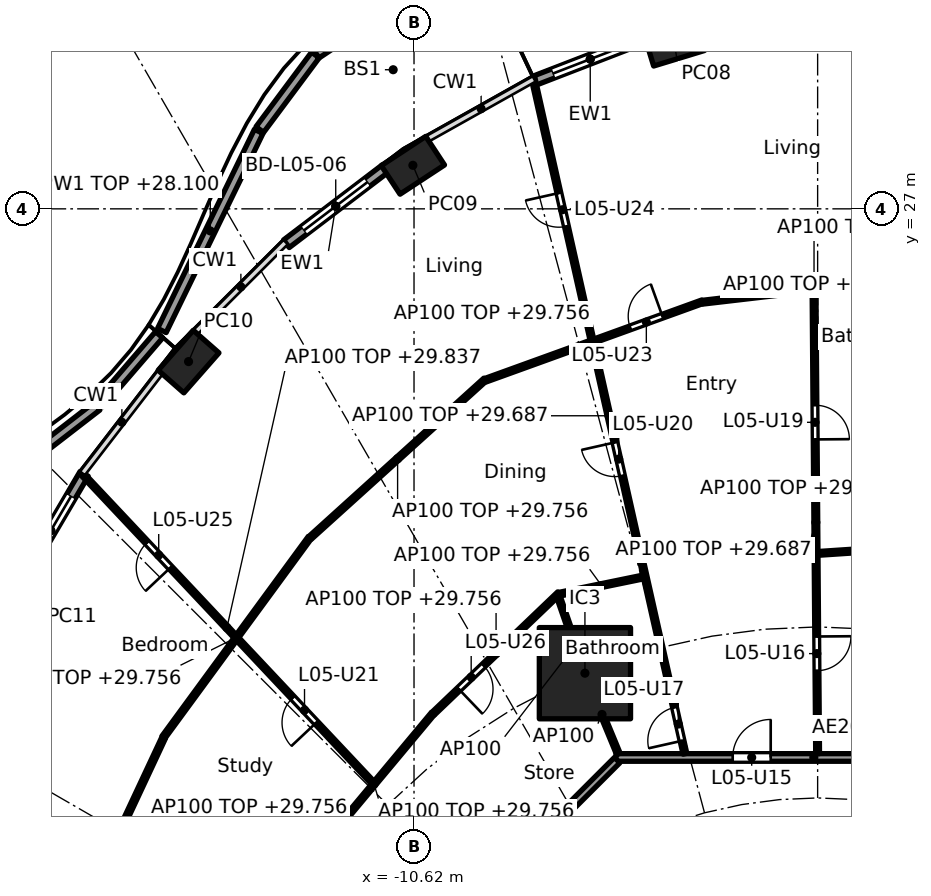
"""IFC4 building model, lengths in metres.
Left out: names, types, materials, properties, quantities, classifications, styles, units other than length and angle.
Written with IfcOpenShell. Run it as: python <this file> out.ifc"""

import sys

from ifc_helpers import new_model, si_unit, direction, frame, frame_2d, origin, origin_2d, place, context, subcontext, project, spatial, rectangle, hollow_rectangle, extrude, element, fill, save


model = new_model("IFC4")
c1 = context("Model", 3, precision=1e-05, world=origin(), true_north=direction((0.0, 1.0)))
c2 = subcontext(c1, "Body", "Model", "MODEL_VIEW")
j1 = project(units=[si_unit("LENGTHUNIT", "METRE"), si_unit("PLANEANGLEUNIT", "RADIAN")], contexts=[c1])
p1 = place(None, origin())
s1 = spatial("IfcSite", under=j1, at=p1, CompositionType="ELEMENT")
p2 = place(p1, origin())
s2 = spatial("IfcBuilding", under=s1, at=p2, CompositionType="ELEMENT")
p3 = place(p2, frame((0.0, 0.0, 27.0)))
s3 = spatial("IfcBuildingStorey", under=s2, at=p3, CompositionType="ELEMENT", Elevation=27.0)
for number, where, z_axis, x_axis in (
    (1, (-3.776, 31.393, 0.0), (0.0, 0.0, 1.0), (-0.957, -0.292, 0.0)),
    (2, (-10.65, 28.146, 0.0), (0.0, 0.0, 1.0), (-0.836, -0.549, 0.0)),
    (3, (-16.552, 22.981, 0.0), (0.0, 0.0, 1.0), (-0.66, -0.751, 0.0)),
):
    element("IfcColumn", number, at=place(p3, frame(where, z_axis=z_axis, x_axis=x_axis)), inside=s3, PredefinedType="COLUMN", context=c2, shape_type="SweptSolid", body=[
        extrude(hollow_rectangle(XDim=1.4, YDim=0.9, WallThickness=0.05, at=origin_2d()), origin(), (0.0, 0.0, 1.0), 3.7),
    ])
p4 = place(p3, frame((-6.123, 14.782, 0.0), z_axis=(0.0, 0.0, 1.0), x_axis=(1.0, 0.0, 0.0)))
e4 = element("IfcColumn", 4, at=p4, inside=s3, PredefinedType="COLUMN", context=c2, shape_type="SweptSolid", body=[
    extrude(rectangle(XDim=2.4, YDim=2.4, at=origin_2d()), origin(), (0.0, 0.0, 1.0), 3.7),
])
p5 = place(p3, frame((-7.453, 30.371, 0.0), z_axis=(0.0, 0.0, 1.0), x_axis=(0.932809381943, 0.360370166577, 0.0)))
e5 = element("IfcWall", 5, at=p5, inside=s3, PredefinedType="SOLIDWALL", context=c2, shape_type="SweptSolid", body=[
    extrude(rectangle(XDim=3.151, YDim=0.25, at=frame_2d((1.575, 0.0))), origin(), (0.0, 0.0, 1.0), 3.44),
])
p6 = place(p5, frame((0.525, 0.0, 0.0)))
e6 = element("IfcOpeningElement", 6, at=p6, cuts=e5, PredefinedType="OPENING", context=c2, shape_type="SweptSolid", body=[
    extrude(rectangle(XDim=2.1, YDim=2.4, at=frame_2d((1.05, 1.2))), frame((0.0, 0.135, 0.0), z_axis=(0.0, -1.0, 0.0), x_axis=(1.0, 0.0, 0.0)), (0.0, 0.0, 1.0), 0.27),
])
p7 = place(p3, frame((-13.979, 26.081, 0.0), z_axis=(0.0, 0.0, 1.0), x_axis=(0.796022293214, 0.605267303517, 0.0)))
e7 = element("IfcWall", 7, at=p7, inside=s3, PredefinedType="SOLIDWALL", context=c2, shape_type="SweptSolid", body=[
    extrude(rectangle(XDim=3.262, YDim=0.25, at=frame_2d((1.631, 0.0))), origin(), (0.0, 0.0, 1.0), 3.44),
])
p8 = place(p7, frame((0.581, 0.0, 0.0)))
e8 = element("IfcOpeningElement", 8, at=p8, cuts=e7, PredefinedType="OPENING", context=c2, shape_type="SweptSolid", body=[
    extrude(rectangle(XDim=2.1, YDim=2.4, at=frame_2d((1.05, 1.2))), frame((0.0, 0.135, 0.0), z_axis=(0.0, -1.0, 0.0), x_axis=(1.0, 0.0, 0.0)), (0.0, 0.0, 1.0), 0.27),
])
p9 = place(p3, frame((-21.052, 17.04, 0.0), z_axis=(0.0, 0.0, 1.0), x_axis=(0.506311160839, 0.862350861546, 0.0)))
e9 = element("IfcWall", 9, at=p9, inside=s3, PredefinedType="SOLIDWALL", context=c2, shape_type="SweptSolid", body=[
    extrude(rectangle(XDim=3.462, YDim=0.25, at=frame_2d((1.731, 0.0))), origin(), (0.0, 0.0, 1.0), 3.44),
])
p10 = place(p9, frame((0.681, 0.0, 0.0)))
e10 = element("IfcOpeningElement", 10, at=p10, cuts=e9, PredefinedType="OPENING", context=c2, shape_type="SweptSolid", body=[
    extrude(rectangle(XDim=2.1, YDim=2.4, at=frame_2d((1.05, 1.2))), frame((0.0, 0.135, 0.0), z_axis=(0.0, -1.0, 0.0), x_axis=(1.0, 0.0, 0.0)), (0.0, 0.0, 1.0), 0.27),
])
p11 = place(p3, frame((-11.228, 32.379, 0.0), z_axis=(0.0, 0.0, 1.0), x_axis=(-0.832193744061, -0.554484961334, 0.0)))
e11 = element("IfcWall", 11, at=p11, inside=s3, PredefinedType="PARAPET", context=c2, shape_type="SweptSolid", body=[
    extrude(rectangle(XDim=2.356, YDim=0.25, at=frame_2d((1.178, 0.0))), origin(), (0.0, 0.0, 1.0), 1.1),
])
p12 = place(p3, frame((-13.215, 31.048, 0.0), z_axis=(0.0, 0.0, 1.0), x_axis=(-0.597715227752, -0.80170849223, 0.0)))
e12 = element("IfcWall", 12, at=p12, inside=s3, PredefinedType="PARAPET", context=c2, shape_type="SweptSolid", body=[
    extrude(rectangle(XDim=2.448, YDim=0.25, at=frame_2d((1.224, 0.0))), origin(), (0.0, 0.0, 1.0), 1.1),
])
p13 = place(p3, frame((-14.707, 29.038, 0.0), z_axis=(0.0, 0.0, 1.0), x_axis=(-0.437296277374, -0.899317499994, 0.0)))
e13 = element("IfcWall", 13, at=p13, inside=s3, PredefinedType="PARAPET", context=c2, shape_type="SweptSolid", body=[
    extrude(rectangle(XDim=5.826, YDim=0.25, at=frame_2d((2.913, 0.0))), origin(), (0.0, 0.0, 1.0), 1.1),
])
p14 = place(p3, frame((-17.327, 23.688, 0.0), z_axis=(0.0, 0.0, 1.0), x_axis=(-0.652642199991, -0.757666258184, 0.0)))
e14 = element("IfcWall", 14, at=p14, inside=s3, PredefinedType="PARAPET", context=c2, shape_type="SweptSolid", body=[
    extrude(rectangle(XDim=2.387, YDim=0.25, at=frame_2d((1.194, 0.0))), origin(), (0.0, 0.0, 1.0), 1.1),
])
p15 = place(p3, frame((-18.961, 21.807, 0.0), z_axis=(0.0, 0.0, 1.0), x_axis=(-0.791260452579, -0.611479268811, 0.0)))
e15 = element("IfcWall", 15, at=p15, inside=s3, PredefinedType="PARAPET", context=c2, shape_type="SweptSolid", body=[
    extrude(rectangle(XDim=6.999, YDim=0.25, at=frame_2d((3.5, 0.0))), origin(), (0.0, 0.0, 1.0), 1.1),
])
p16 = place(p3, frame((5.104, 12.565, 0.0), z_axis=(0.0, 0.0, 1.0), x_axis=(-1.0, 0.0, 0.0)))
e16 = element("IfcWall", 16, at=p16, inside=s3, PredefinedType="PARTITIONING", context=c2, shape_type="SweptSolid", body=[
    extrude(rectangle(XDim=10.409, YDim=0.2, at=frame_2d((5.205, 0.0))), origin(), (0.0, 0.0, 1.0), 3.44),
])
p17 = place(p16, frame((6.339, 0.0, 0.0)))
e17 = element("IfcOpeningElement", 17, at=p17, cuts=e16, PredefinedType="OPENING", context=c2, shape_type="SweptSolid", body=[
    extrude(rectangle(XDim=1.0, YDim=2.1, at=frame_2d((0.5, 1.05))), frame((0.0, 0.11, 0.0), z_axis=(0.0, -1.0, 0.0), x_axis=(1.0, 0.0, 0.0)), (0.0, 0.0, 1.0), 0.22),
])
p18 = place(p3, frame((-5.275, 12.494, 0.0), z_axis=(0.0, 0.0, 1.0), x_axis=(-0.707106781187, -0.707106781187, 0.0)))
e18 = element("IfcWall", 18, at=p18, inside=s3, PredefinedType="PARTITIONING", context=c2, shape_type="SweptSolid", body=[
    extrude(rectangle(XDim=10.209, YDim=0.2, at=frame_2d((5.104, 0.0))), origin(), (0.0, 0.0, 1.0), 3.44),
])
p19 = place(p3, frame((2.188, 18.079, 0.0), z_axis=(0.0, 0.0, 1.0), x_axis=(-0.997794542617, -0.066378089183, 0.0)))
e19 = element("IfcWall", 19, at=p19, inside=s3, PredefinedType="PARTITIONING", context=c2, shape_type="SweptSolid", body=[
    extrude(rectangle(XDim=2.185, YDim=0.1, at=frame_2d((1.092, 0.0))), origin(), (0.0, 0.0, 1.0), 2.756),
])
p20 = place(p3, frame((2.842, 25.229, 0.0), z_axis=(0.0, 0.0, 1.0), x_axis=(-0.993255612046, -0.115945198862, 0.0)))
e20 = element("IfcWall", 20, at=p20, inside=s3, PredefinedType="PARTITIONING", context=c2, shape_type="SweptSolid", body=[
    extrude(rectangle(XDim=5.913, YDim=0.1, at=frame_2d((2.956, 0.0))), origin(), (0.0, 0.0, 1.0), 2.756),
])
p21 = place(p3, frame((-0.001, 12.665, 0.0), z_axis=(0.0, 0.0, 1.0), x_axis=(-0.007702417287, 0.999970335944, 0.0)))
e21 = element("IfcWall", 21, at=p21, inside=s3, PredefinedType="PARTITIONING", context=c2, shape_type="SweptSolid", body=[
    extrude(rectangle(XDim=12.171, YDim=0.1, at=frame_2d((6.086, 0.0))), origin(), (0.0, 0.0, 1.0), 2.687),
])
p22 = place(p21, frame((2.183, 0.0, 0.0)))
e22 = element("IfcOpeningElement", 22, at=p22, cuts=e21, PredefinedType="OPENING", context=c2, shape_type="SweptSolid", body=[
    extrude(rectangle(XDim=0.9, YDim=2.1, at=frame_2d((0.45, 1.05))), frame((0.0, 0.06, 0.0), z_axis=(0.0, -1.0, 0.0), x_axis=(1.0, 0.0, 0.0)), (0.0, 0.0, 1.0), 0.12),
])
p23 = place(p21, frame((8.269, 0.0, 0.0)))
e23 = element("IfcOpeningElement", 23, at=p23, cuts=e21, PredefinedType="OPENING", context=c2, shape_type="SweptSolid", body=[
    extrude(rectangle(XDim=0.9, YDim=2.1, at=frame_2d((0.45, 1.05))), frame((0.0, 0.06, 0.0), z_axis=(0.0, -1.0, 0.0), x_axis=(1.0, 0.0, 0.0)), (0.0, 0.0, 1.0), 0.12),
])
p24 = place(p3, frame((-3.034, 24.554, 0.0), z_axis=(0.0, 0.0, 1.0), x_axis=(-0.940401691072, -0.340065669288, 0.0)))
e24 = element("IfcWall", 24, at=p24, inside=s3, PredefinedType="PARTITIONING", context=c2, shape_type="SweptSolid", body=[
    extrude(rectangle(XDim=6.067, YDim=0.1, at=frame_2d((3.034, 0.0))), origin(), (0.0, 0.0, 1.0), 2.756),
])
p25 = place(p24, frame((1.117, 0.0, 0.0)))
e25 = element("IfcOpeningElement", 25, at=p25, cuts=e24, PredefinedType="OPENING", context=c2, shape_type="SweptSolid", body=[
    extrude(rectangle(XDim=0.9, YDim=2.1, at=frame_2d((0.45, 1.05))), frame((0.0, 0.06, 0.0), z_axis=(0.0, -1.0, 0.0), x_axis=(1.0, 0.0, 0.0)), (0.0, 0.0, 1.0), 0.12),
])
p26 = place(p3, frame((-3.492, 12.662, 0.0), z_axis=(0.0, 0.0, 1.0), x_axis=(-0.219268088006, 0.975664648115, 0.0)))
e26 = element("IfcWall", 26, at=p26, inside=s3, PredefinedType="PARTITIONING", context=c2, shape_type="SweptSolid", body=[
    extrude(rectangle(XDim=18.23, YDim=0.1, at=frame_2d((9.115, 0.0))), origin(), (0.0, 0.0, 1.0), 2.687),
])
p27 = place(p26, frame((0.35, 0.0, 0.0)))
e27 = element("IfcOpeningElement", 27, at=p27, cuts=e26, PredefinedType="OPENING", context=c2, shape_type="SweptSolid", body=[
    extrude(rectangle(XDim=0.9, YDim=2.1, at=frame_2d((0.45, 1.05))), frame((0.0, 0.06, 0.0), z_axis=(0.0, -1.0, 0.0), x_axis=(1.0, 0.0, 0.0)), (0.0, 0.0, 1.0), 0.12),
])
p28 = place(p26, frame((7.497, 0.0, 0.0)))
e28 = element("IfcOpeningElement", 28, at=p28, cuts=e26, PredefinedType="OPENING", context=c2, shape_type="SweptSolid", body=[
    extrude(rectangle(XDim=0.9, YDim=2.1, at=frame_2d((0.45, 1.05))), frame((0.0, 0.06, 0.0), z_axis=(0.0, -1.0, 0.0), x_axis=(1.0, 0.0, 0.0)), (0.0, 0.0, 1.0), 0.12),
])
p29 = place(p26, frame((14.223, 0.0, 0.0)))
e29 = element("IfcOpeningElement", 29, at=p29, cuts=e26, PredefinedType="OPENING", context=c2, shape_type="SweptSolid", body=[
    extrude(rectangle(XDim=0.9, YDim=2.1, at=frame_2d((0.45, 1.05))), frame((0.0, 0.06, 0.0), z_axis=(0.0, -1.0, 0.0), x_axis=(1.0, 0.0, 0.0)), (0.0, 0.0, 1.0), 0.12),
])
p30 = place(p3, frame((-4.58, 17.315, 0.0), z_axis=(0.0, 0.0, 1.0), x_axis=(-0.979581941859, -0.201045316246, 0.0)))
e30 = element("IfcWall", 30, at=p30, inside=s3, PredefinedType="PARTITIONING", context=c2, shape_type="SweptSolid", body=[
    extrude(rectangle(XDim=2.256, YDim=0.1, at=frame_2d((1.128, 0.0))), origin(), (0.0, 0.0, 1.0), 2.756),
])
p31 = place(p3, frame((-5.243, 12.657, 0.0), z_axis=(0.0, 0.0, 1.0), x_axis=(-0.382719158442, 0.923864733477, 0.0)))
e31 = element("IfcWall", 31, at=p31, inside=s3, PredefinedType="PARTITIONING", context=c2, shape_type="SweptSolid", body=[
    extrude(rectangle(XDim=2.25, YDim=0.1, at=frame_2d((1.125, 0.0))), origin(), (0.0, 0.0, 1.0), 3.44),
])
p32 = place(p3, frame((-6.139, 14.83, 0.0), z_axis=(0.0, 0.0, 1.0), x_axis=(-0.327246993321, 0.944938836837, 0.0)))
e32 = element("IfcWall", 32, at=p32, inside=s3, PredefinedType="PARTITIONING", context=c2, shape_type="SweptSolid", body=[
    extrude(rectangle(XDim=2.09, YDim=0.1, at=frame_2d((1.045, 0.0))), origin(), (0.0, 0.0, 1.0), 3.44),
])
p33 = place(p3, frame((-6.803, 16.886, 0.0), z_axis=(0.0, 0.0, 1.0), x_axis=(-0.722763212502, -0.69109575216, 0.0)))
e33 = element("IfcWall", 33, at=p33, inside=s3, PredefinedType="PARTITIONING", context=c2, shape_type="SweptSolid", body=[
    extrude(rectangle(XDim=4.587, YDim=0.1, at=frame_2d((2.293, 0.0))), origin(), (0.0, 0.0, 1.0), 2.756),
])
p34 = place(p33, frame((2.75, 0.0, 0.0)))
e34 = element("IfcOpeningElement", 34, at=p34, cuts=e33, PredefinedType="OPENING", context=c2, shape_type="SweptSolid", body=[
    extrude(rectangle(XDim=0.9, YDim=2.1, at=frame_2d((0.45, 1.05))), frame((0.0, 0.06, 0.0), z_axis=(0.0, -1.0, 0.0), x_axis=(1.0, 0.0, 0.0)), (0.0, 0.0, 1.0), 0.12),
])
p35 = place(p3, frame((-8.749, 22.508, 0.0), z_axis=(0.0, 0.0, 1.0), x_axis=(-0.741720189244, -0.670709445936, 0.0)))
e35 = element("IfcWall", 35, at=p35, inside=s3, PredefinedType="PARTITIONING", context=c2, shape_type="SweptSolid", body=[
    extrude(rectangle(XDim=6.209, YDim=0.1, at=frame_2d((3.104, 0.0))), origin(), (0.0, 0.0, 1.0), 2.756),
])
p36 = place(p3, frame((-10.123, 13.72, 0.0), z_axis=(0.0, 0.0, 1.0), x_axis=(-0.64083455704, -0.767679015282, 0.0)))
e36 = element("IfcWall", 36, at=p36, inside=s3, PredefinedType="PARTITIONING", context=c2, shape_type="SweptSolid", body=[
    extrude(rectangle(XDim=4.837, YDim=0.1, at=frame_2d((2.418, 0.0))), origin(), (0.0, 0.0, 1.0), 2.756),
])
p37 = place(p3, frame((-13.362, 18.35, 0.0), z_axis=(0.0, 0.0, 1.0), x_axis=(-0.591191311491, -0.806531359104, 0.0)))
e37 = element("IfcWall", 37, at=p37, inside=s3, PredefinedType="PARTITIONING", context=c2, shape_type="SweptSolid", body=[
    extrude(rectangle(XDim=6.51, YDim=0.1, at=frame_2d((3.255, 0.0))), origin(), (0.0, 0.0, 1.0), 2.756),
])
p38 = place(p3, frame((-11.707, 11.9, 0.0), z_axis=(0.0, 0.0, 1.0), x_axis=(-0.685030806147, 0.728514100501, 0.0)))
e38 = element("IfcWall", 38, at=p38, inside=s3, PredefinedType="PARTITIONING", context=c2, shape_type="SweptSolid", body=[
    extrude(rectangle(XDim=11.201, YDim=0.1, at=frame_2d((5.601, 0.0))), origin(), (0.0, 0.0, 1.0), 2.837),
])
p39 = place(p38, frame((2.169, 0.0, 0.0)))
e39 = element("IfcOpeningElement", 39, at=p39, cuts=e38, PredefinedType="OPENING", context=c2, shape_type="SweptSolid", body=[
    extrude(rectangle(XDim=0.9, YDim=2.1, at=frame_2d((0.45, 1.05))), frame((0.0, 0.06, 0.0), z_axis=(0.0, -1.0, 0.0), x_axis=(1.0, 0.0, 0.0)), (0.0, 0.0, 1.0), 0.12),
])
p40 = place(p38, frame((7.77, 0.0, 0.0)))
e40 = element("IfcOpeningElement", 40, at=p40, cuts=e38, PredefinedType="OPENING", context=c2, shape_type="SweptSolid", body=[
    extrude(rectangle(XDim=0.9, YDim=2.1, at=frame_2d((0.45, 1.05))), frame((0.0, 0.06, 0.0), z_axis=(0.0, -1.0, 0.0), x_axis=(1.0, 0.0, 0.0)), (0.0, 0.0, 1.0), 0.12),
])
p41 = place(p3, frame((-17.203, 13.095, 0.0), z_axis=(0.0, 0.0, 1.0), x_axis=(-0.423926333401, -0.905696673202, 0.0)))
e41 = element("IfcWall", 41, at=p41, inside=s3, PredefinedType="PARTITIONING", context=c2, shape_type="SweptSolid", body=[
    extrude(rectangle(XDim=6.188, YDim=0.1, at=frame_2d((3.094, 0.0))), origin(), (0.0, 0.0, 1.0), 2.756),
])
p42 = place(p6, origin())
e42 = element("IfcDoor", 42, at=p42, inside=s3, OperationType="SLIDING_TO_LEFT", PredefinedType="DOOR", context=c2, shape_type="SweptSolid", body=[
    extrude(rectangle(XDim=2.1, YDim=2.4, at=frame_2d((1.05, 1.2))), frame((0.0, 0.025, 0.0), z_axis=(0.0, -1.0, 0.0), x_axis=(1.0, 0.0, 0.0)), (0.0, 0.0, 1.0), 0.05),
])
fill(e6, e42)
p43 = place(p8, origin())
e43 = element("IfcDoor", 43, at=p43, inside=s3, OperationType="SLIDING_TO_LEFT", PredefinedType="DOOR", context=c2, shape_type="SweptSolid", body=[
    extrude(rectangle(XDim=2.1, YDim=2.4, at=frame_2d((1.05, 1.2))), frame((0.0, 0.025, 0.0), z_axis=(0.0, -1.0, 0.0), x_axis=(1.0, 0.0, 0.0)), (0.0, 0.0, 1.0), 0.05),
])
fill(e8, e43)
p44 = place(p10, origin())
e44 = element("IfcDoor", 44, at=p44, inside=s3, OperationType="SLIDING_TO_LEFT", PredefinedType="DOOR", context=c2, shape_type="SweptSolid", body=[
    extrude(rectangle(XDim=2.1, YDim=2.4, at=frame_2d((1.05, 1.2))), frame((0.0, 0.025, 0.0), z_axis=(0.0, -1.0, 0.0), x_axis=(1.0, 0.0, 0.0)), (0.0, 0.0, 1.0), 0.05),
])
fill(e10, e44)
p45 = place(p3, frame((0.0, 0.0, -0.25)))
p46 = place(p45, frame((-18.921, 31.755, 0.0), z_axis=(0.0, 0.0, 1.0), x_axis=(-0.753265007301, -0.657717134319, 0.0)))
p47 = place(p46, frame((0.0, 0.0, 0.2)))
e45 = element("IfcWindow", 45, at=p47, inside=s3, PartitioningType="SINGLE_PANEL", PredefinedType="SKYLIGHT", context=c2, shape_type="SweptSolid", body=[
    extrude(rectangle(XDim=5.0, YDim=2.0, at=origin_2d()), origin(), (0.0, 0.0, 1.0), 1.25),
])
p48 = place(p17, frame((1.0, 0.0, 0.0), x_axis=(-1.0, 0.0, 0.0)))
e46 = element("IfcDoor", 46, at=p48, inside=s3, OperationType="SINGLE_SWING_RIGHT", PredefinedType="DOOR", context=c2, shape_type="SweptSolid", body=[
    extrude(rectangle(XDim=1.0, YDim=2.1, at=frame_2d((0.5, 1.05))), frame((0.0, 0.025, 0.0), z_axis=(0.0, -1.0, 0.0), x_axis=(1.0, 0.0, 0.0)), (0.0, 0.0, 1.0), 0.05),
])
fill(e17, e46)
p49 = place(p22, frame((0.9, 0.0, 0.0), x_axis=(-1.0, 0.0, 0.0)))
e47 = element("IfcDoor", 47, at=p49, inside=s3, OperationType="SINGLE_SWING_LEFT", PredefinedType="DOOR", context=c2, shape_type="SweptSolid", body=[
    extrude(rectangle(XDim=0.9, YDim=2.1, at=frame_2d((0.45, 1.05))), frame((0.0, 0.025, 0.0), z_axis=(0.0, -1.0, 0.0), x_axis=(1.0, 0.0, 0.0)), (0.0, 0.0, 1.0), 0.05),
])
fill(e22, e47)
p50 = place(p27, origin())
e48 = element("IfcDoor", 48, at=p50, inside=s3, OperationType="SINGLE_SWING_LEFT", PredefinedType="DOOR", context=c2, shape_type="SweptSolid", body=[
    extrude(rectangle(XDim=0.9, YDim=2.1, at=frame_2d((0.45, 1.05))), frame((0.0, 0.025, 0.0), z_axis=(0.0, -1.0, 0.0), x_axis=(1.0, 0.0, 0.0)), (0.0, 0.0, 1.0), 0.05),
])
fill(e27, e48)
p51 = place(p23, frame((0.9, 0.0, 0.0), x_axis=(-1.0, 0.0, 0.0)))
e49 = element("IfcDoor", 49, at=p51, inside=s3, OperationType="SINGLE_SWING_RIGHT", PredefinedType="DOOR", context=c2, shape_type="SweptSolid", body=[
    extrude(rectangle(XDim=0.9, YDim=2.1, at=frame_2d((0.45, 1.05))), frame((0.0, 0.025, 0.0), z_axis=(0.0, -1.0, 0.0), x_axis=(1.0, 0.0, 0.0)), (0.0, 0.0, 1.0), 0.05),
])
fill(e23, e49)
p52 = place(p28, origin())
e50 = element("IfcDoor", 50, at=p52, inside=s3, OperationType="SINGLE_SWING_RIGHT", PredefinedType="DOOR", context=c2, shape_type="SweptSolid", body=[
    extrude(rectangle(XDim=0.9, YDim=2.1, at=frame_2d((0.45, 1.05))), frame((0.0, 0.025, 0.0), z_axis=(0.0, -1.0, 0.0), x_axis=(1.0, 0.0, 0.0)), (0.0, 0.0, 1.0), 0.05),
])
fill(e28, e50)
p53 = place(p39, origin())
e51 = element("IfcDoor", 51, at=p53, inside=s3, OperationType="SINGLE_SWING_LEFT", PredefinedType="DOOR", context=c2, shape_type="SweptSolid", body=[
    extrude(rectangle(XDim=0.9, YDim=2.1, at=frame_2d((0.45, 1.05))), frame((0.0, 0.025, 0.0), z_axis=(0.0, -1.0, 0.0), x_axis=(1.0, 0.0, 0.0)), (0.0, 0.0, 1.0), 0.05),
])
fill(e39, e51)
p54 = place(p25, frame((0.9, 0.0, 0.0), x_axis=(-1.0, 0.0, 0.0)))
e52 = element("IfcDoor", 52, at=p54, inside=s3, OperationType="SINGLE_SWING_RIGHT", PredefinedType="DOOR", context=c2, shape_type="SweptSolid", body=[
    extrude(rectangle(XDim=0.9, YDim=2.1, at=frame_2d((0.45, 1.05))), frame((0.0, 0.025, 0.0), z_axis=(0.0, -1.0, 0.0), x_axis=(1.0, 0.0, 0.0)), (0.0, 0.0, 1.0), 0.05),
])
fill(e25, e52)
p55 = place(p29, origin())
e53 = element("IfcDoor", 53, at=p55, inside=s3, OperationType="SINGLE_SWING_RIGHT", PredefinedType="DOOR", context=c2, shape_type="SweptSolid", body=[
    extrude(rectangle(XDim=0.9, YDim=2.1, at=frame_2d((0.45, 1.05))), frame((0.0, 0.025, 0.0), z_axis=(0.0, -1.0, 0.0), x_axis=(1.0, 0.0, 0.0)), (0.0, 0.0, 1.0), 0.05),
])
fill(e29, e53)
p56 = place(p40, origin())
e54 = element("IfcDoor", 54, at=p56, inside=s3, OperationType="SINGLE_SWING_LEFT", PredefinedType="DOOR", context=c2, shape_type="SweptSolid", body=[
    extrude(rectangle(XDim=0.9, YDim=2.1, at=frame_2d((0.45, 1.05))), frame((0.0, 0.025, 0.0), z_axis=(0.0, -1.0, 0.0), x_axis=(1.0, 0.0, 0.0)), (0.0, 0.0, 1.0), 0.05),
])
fill(e40, e54)
p57 = place(p34, origin())
e55 = element("IfcDoor", 55, at=p57, inside=s3, OperationType="SINGLE_SWING_RIGHT", PredefinedType="DOOR", context=c2, shape_type="SweptSolid", body=[
    extrude(rectangle(XDim=0.9, YDim=2.1, at=frame_2d((0.45, 1.05))), frame((0.0, 0.025, 0.0), z_axis=(0.0, -1.0, 0.0), x_axis=(1.0, 0.0, 0.0)), (0.0, 0.0, 1.0), 0.05),
])
fill(e34, e55)
save(model, sys.argv[1])
